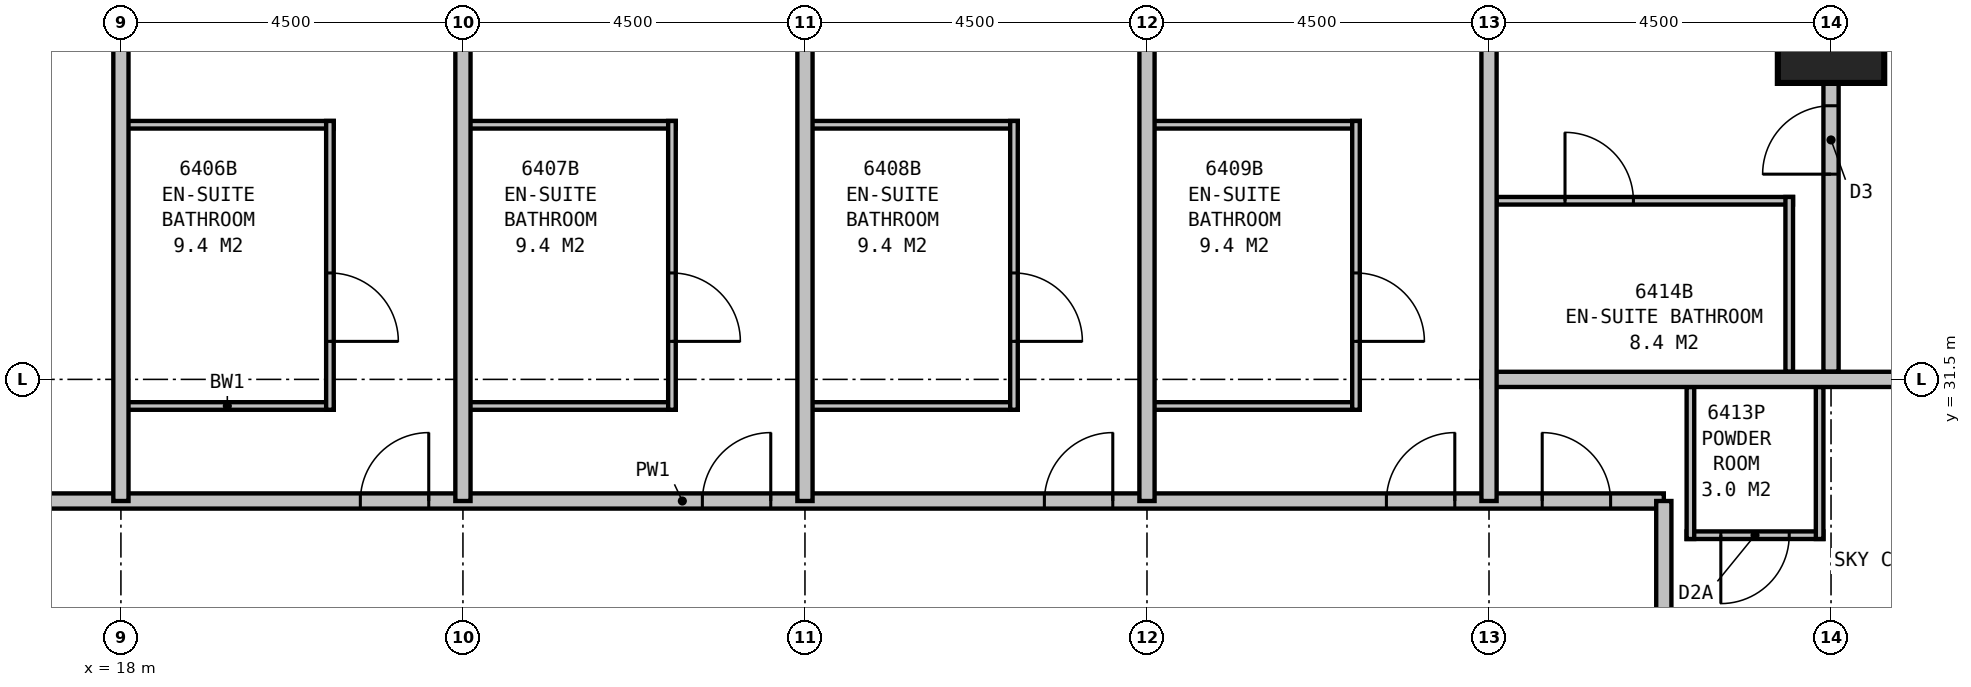
"""IFC4 building model, lengths in metres.
Left out: names, types, materials, properties, quantities, classifications, styles, units other than length and angle.
Written with IfcOpenShell. Run it as: python <this file> out.ifc"""

import sys

from ifc_helpers import new_model, si_unit, direction, frame, frame_2d, origin, origin_2d, place, context, subcontext, project, spatial, rectangle, extrude, element, fill, save


model = new_model("IFC4")
c1 = context("Model", 3, precision=1e-05, world=origin(), true_north=direction((0.0, 1.0)))
c2 = subcontext(c1, "Body", "Model", "MODEL_VIEW")
j1 = project(units=[si_unit("LENGTHUNIT", "METRE"), si_unit("PLANEANGLEUNIT", "RADIAN")], contexts=[c1])
p1 = place(None, origin())
s1 = spatial("IfcSite", under=j1, at=p1, CompositionType="ELEMENT")
p2 = place(p1, origin())
s2 = spatial("IfcBuilding", under=s1, at=p2, CompositionType="ELEMENT")
p3 = place(p2, frame((0.0, 0.0, 250.7)))
s3 = spatial("IfcBuildingStorey", under=s2, at=p3, CompositionType="ELEMENT", Elevation=250.7)
p4 = place(p3, frame((40.5, 36.0, 0.0), z_axis=(0.0, 0.0, 1.0), x_axis=(1.0, 0.0, 0.0)))
e1 = element("IfcColumn", 1, at=p4, inside=s3, PredefinedType="COLUMN", context=c2, shape_type="SweptSolid", body=[
    extrude(rectangle(XDim=1.4, YDim=1.2, at=origin_2d()), origin(), (0.0, 0.0, 1.0), 3.9),
])
p5 = place(p3, frame((12.473, 29.9, 0.0), z_axis=(0.0, 0.0, 1.0), x_axis=(1.0, 0.0, 0.0)))
e2 = element("IfcWall", 2, at=p5, inside=s3, PredefinedType="PARTITIONING", context=c2, shape_type="SweptSolid", body=[
    extrude(rectangle(XDim=25.827, YDim=0.2, at=frame_2d((12.914, 0.0))), origin(), (0.0, 0.0, 1.0), 3.65),
])
p6 = place(p5, frame((0.85, 0.0, 0.0)))
e3 = element("IfcOpeningElement", 3, at=p6, cuts=e2, PredefinedType="OPENING", context=c2, shape_type="SweptSolid", body=[
    extrude(rectangle(XDim=0.9, YDim=2.1, at=frame_2d((0.45, 1.05))), frame((0.0, 0.11, 0.0), z_axis=(0.0, -1.0, 0.0), x_axis=(1.0, 0.0, 0.0)), (0.0, 0.0, 1.0), 0.22),
])
p7 = place(p5, frame((8.677, 0.0, 0.0)))
e4 = element("IfcOpeningElement", 4, at=p7, cuts=e2, PredefinedType="OPENING", context=c2, shape_type="SweptSolid", body=[
    extrude(rectangle(XDim=0.9, YDim=2.1, at=frame_2d((0.45, 1.05))), frame((0.0, 0.11, 0.0), z_axis=(0.0, -1.0, 0.0), x_axis=(1.0, 0.0, 0.0)), (0.0, 0.0, 1.0), 0.22),
])
p8 = place(p5, frame((13.177, 0.0, 0.0)))
e5 = element("IfcOpeningElement", 5, at=p8, cuts=e2, PredefinedType="OPENING", context=c2, shape_type="SweptSolid", body=[
    extrude(rectangle(XDim=0.9, YDim=2.1, at=frame_2d((0.45, 1.05))), frame((0.0, 0.11, 0.0), z_axis=(0.0, -1.0, 0.0), x_axis=(1.0, 0.0, 0.0)), (0.0, 0.0, 1.0), 0.22),
])
p9 = place(p5, frame((17.677, 0.0, 0.0)))
e6 = element("IfcOpeningElement", 6, at=p9, cuts=e2, PredefinedType="OPENING", context=c2, shape_type="SweptSolid", body=[
    extrude(rectangle(XDim=0.9, YDim=2.1, at=frame_2d((0.45, 1.05))), frame((0.0, 0.11, 0.0), z_axis=(0.0, -1.0, 0.0), x_axis=(1.0, 0.0, 0.0)), (0.0, 0.0, 1.0), 0.22),
])
p10 = place(p5, frame((22.177, 0.0, 0.0)))
e7 = element("IfcOpeningElement", 7, at=p10, cuts=e2, PredefinedType="OPENING", context=c2, shape_type="SweptSolid", body=[
    extrude(rectangle(XDim=0.9, YDim=2.1, at=frame_2d((0.45, 1.05))), frame((0.0, 0.11, 0.0), z_axis=(0.0, -1.0, 0.0), x_axis=(1.0, 0.0, 0.0)), (0.0, 0.0, 1.0), 0.22),
])
p11 = place(p5, frame((24.227, 0.0, 0.0)))
e8 = element("IfcOpeningElement", 8, at=p11, cuts=e2, PredefinedType="OPENING", context=c2, shape_type="SweptSolid", body=[
    extrude(rectangle(XDim=0.9, YDim=2.1, at=frame_2d((0.45, 1.05))), frame((0.0, 0.11, 0.0), z_axis=(0.0, -1.0, 0.0), x_axis=(1.0, 0.0, 0.0)), (0.0, 0.0, 1.0), 0.22),
])
p12 = place(p3, frame((38.3, 11.2, 0.0), z_axis=(0.0, 0.0, 1.0), x_axis=(0.0, 1.0, 0.0)))
e9 = element("IfcWall", 9, at=p12, inside=s3, PredefinedType="PARTITIONING", context=c2, shape_type="SweptSolid", body=[
    extrude(rectangle(XDim=18.7, YDim=0.2, at=frame_2d((9.35, 0.0))), origin(), (0.0, 0.0, 1.0), 3.65),
])
p13 = place(p12, frame((6.45, 0.0, 0.0), z_axis=(0.0, 0.0, 1.0), x_axis=(-1.0, 0.0, 0.0)))
e10 = element("IfcOpeningElement", 10, at=p13, cuts=e9, PredefinedType="OPENING", context=c2, shape_type="SweptSolid", body=[
    extrude(rectangle(XDim=1.0, YDim=2.1, at=frame_2d((0.5, 1.05))), frame((0.0, 0.11, 0.0), z_axis=(0.0, -1.0, 0.0), x_axis=(1.0, 0.0, 0.0)), (0.0, 0.0, 1.0), 0.22),
])
p14 = place(p12, frame((10.45, 0.0, 0.0), z_axis=(0.0, 0.0, 1.0), x_axis=(-1.0, 0.0, 0.0)))
e11 = element("IfcOpeningElement", 11, at=p14, cuts=e9, PredefinedType="OPENING", context=c2, shape_type="SweptSolid", body=[
    extrude(rectangle(XDim=0.9, YDim=2.1, at=frame_2d((0.45, 1.05))), frame((0.0, 0.11, 0.0), z_axis=(0.0, -1.0, 0.0), x_axis=(1.0, 0.0, 0.0)), (0.0, 0.0, 1.0), 0.22),
])
for number, where, z_axis, x_axis in (
    (12, (18.0, 29.9, 0.0), (0.0, 0.0, 1.0), (0.0, 1.0, 0.0)),
    (13, (22.5, 29.9, 0.0), (0.0, 0.0, 1.0), (0.0, 1.0, 0.0)),
    (14, (27.0, 29.9, 0.0), (0.0, 0.0, 1.0), (0.0, 1.0, 0.0)),
    (15, (31.5, 29.9, 0.0), (0.0, 0.0, 1.0), (0.0, 1.0, 0.0)),
):
    element("IfcWall", number, at=place(p3, frame(where, z_axis=z_axis, x_axis=x_axis)), inside=s3, PredefinedType="PARTITIONING", context=c2, shape_type="SweptSolid", body=[
        extrude(rectangle(XDim=10.6, YDim=0.2, at=frame_2d((5.3, 0.0))), origin(), (0.0, 0.0, 1.0), 2.65),
    ])
for number, where, z_axis, x_axis in (
    (16, (18.0, 31.15, 0.0), (0.0, 0.0, 1.0), (1.0, 0.0, 0.0)),
    (17, (18.0, 34.85, 0.0), (0.0, 0.0, 1.0), (1.0, 0.0, 0.0)),
):
    element("IfcWall", number, at=place(p3, frame(where, z_axis=z_axis, x_axis=x_axis)), inside=s3, PredefinedType="PLUMBINGWALL", context=c2, shape_type="SweptSolid", body=[
        extrude(rectangle(XDim=2.8, YDim=0.1, at=frame_2d((1.4, 0.0))), origin(), (0.0, 0.0, 1.0), 3.65),
    ])
p15 = place(p3, frame((20.75, 31.1, 0.0), z_axis=(0.0, 0.0, 1.0), x_axis=(0.0, 1.0, 0.0)))
e18 = element("IfcWall", 18, at=p15, inside=s3, PredefinedType="PLUMBINGWALL", context=c2, shape_type="SweptSolid", body=[
    extrude(rectangle(XDim=3.8, YDim=0.1, at=frame_2d((1.9, 0.0))), origin(), (0.0, 0.0, 1.0), 3.65),
])
p16 = place(p15, frame((1.8, 0.0, 0.0), z_axis=(0.0, 0.0, 1.0), x_axis=(-1.0, 0.0, 0.0)))
e19 = element("IfcOpeningElement", 19, at=p16, cuts=e18, PredefinedType="OPENING", context=c2, shape_type="SweptSolid", body=[
    extrude(rectangle(XDim=0.9, YDim=2.1, at=frame_2d((0.45, 1.05))), frame((0.0, 0.06, 0.0), z_axis=(0.0, -1.0, 0.0), x_axis=(1.0, 0.0, 0.0)), (0.0, 0.0, 1.0), 0.12),
])
for number, where, z_axis, x_axis in (
    (20, (22.5, 31.15, 0.0), (0.0, 0.0, 1.0), (1.0, 0.0, 0.0)),
    (21, (22.5, 34.85, 0.0), (0.0, 0.0, 1.0), (1.0, 0.0, 0.0)),
):
    element("IfcWall", number, at=place(p3, frame(where, z_axis=z_axis, x_axis=x_axis)), inside=s3, PredefinedType="PLUMBINGWALL", context=c2, shape_type="SweptSolid", body=[
        extrude(rectangle(XDim=2.8, YDim=0.1, at=frame_2d((1.4, 0.0))), origin(), (0.0, 0.0, 1.0), 3.65),
    ])
p17 = place(p3, frame((25.25, 31.1, 0.0), z_axis=(0.0, 0.0, 1.0), x_axis=(0.0, 1.0, 0.0)))
e22 = element("IfcWall", 22, at=p17, inside=s3, PredefinedType="PLUMBINGWALL", context=c2, shape_type="SweptSolid", body=[
    extrude(rectangle(XDim=3.8, YDim=0.1, at=frame_2d((1.9, 0.0))), origin(), (0.0, 0.0, 1.0), 3.65),
])
p18 = place(p17, frame((1.8, 0.0, 0.0), z_axis=(0.0, 0.0, 1.0), x_axis=(-1.0, 0.0, 0.0)))
e23 = element("IfcOpeningElement", 23, at=p18, cuts=e22, PredefinedType="OPENING", context=c2, shape_type="SweptSolid", body=[
    extrude(rectangle(XDim=0.9, YDim=2.1, at=frame_2d((0.45, 1.05))), frame((0.0, 0.06, 0.0), z_axis=(0.0, -1.0, 0.0), x_axis=(1.0, 0.0, 0.0)), (0.0, 0.0, 1.0), 0.12),
])
for number, where, z_axis, x_axis in (
    (24, (27.0, 31.15, 0.0), (0.0, 0.0, 1.0), (1.0, 0.0, 0.0)),
    (25, (27.0, 34.85, 0.0), (0.0, 0.0, 1.0), (1.0, 0.0, 0.0)),
):
    element("IfcWall", number, at=place(p3, frame(where, z_axis=z_axis, x_axis=x_axis)), inside=s3, PredefinedType="PLUMBINGWALL", context=c2, shape_type="SweptSolid", body=[
        extrude(rectangle(XDim=2.8, YDim=0.1, at=frame_2d((1.4, 0.0))), origin(), (0.0, 0.0, 1.0), 3.65),
    ])
p19 = place(p3, frame((29.75, 31.1, 0.0), z_axis=(0.0, 0.0, 1.0), x_axis=(0.0, 1.0, 0.0)))
e26 = element("IfcWall", 26, at=p19, inside=s3, PredefinedType="PLUMBINGWALL", context=c2, shape_type="SweptSolid", body=[
    extrude(rectangle(XDim=3.8, YDim=0.1, at=frame_2d((1.9, 0.0))), origin(), (0.0, 0.0, 1.0), 3.65),
])
p20 = place(p19, frame((1.8, 0.0, 0.0), z_axis=(0.0, 0.0, 1.0), x_axis=(-1.0, 0.0, 0.0)))
e27 = element("IfcOpeningElement", 27, at=p20, cuts=e26, PredefinedType="OPENING", context=c2, shape_type="SweptSolid", body=[
    extrude(rectangle(XDim=0.9, YDim=2.1, at=frame_2d((0.45, 1.05))), frame((0.0, 0.06, 0.0), z_axis=(0.0, -1.0, 0.0), x_axis=(1.0, 0.0, 0.0)), (0.0, 0.0, 1.0), 0.12),
])
for number, where, z_axis, x_axis in (
    (28, (31.5, 31.15, 0.0), (0.0, 0.0, 1.0), (1.0, 0.0, 0.0)),
    (29, (31.5, 34.85, 0.0), (0.0, 0.0, 1.0), (1.0, 0.0, 0.0)),
):
    element("IfcWall", number, at=place(p3, frame(where, z_axis=z_axis, x_axis=x_axis)), inside=s3, PredefinedType="PLUMBINGWALL", context=c2, shape_type="SweptSolid", body=[
        extrude(rectangle(XDim=2.8, YDim=0.1, at=frame_2d((1.4, 0.0))), origin(), (0.0, 0.0, 1.0), 3.65),
    ])
p21 = place(p3, frame((34.25, 31.1, 0.0), z_axis=(0.0, 0.0, 1.0), x_axis=(0.0, 1.0, 0.0)))
e30 = element("IfcWall", 30, at=p21, inside=s3, PredefinedType="PLUMBINGWALL", context=c2, shape_type="SweptSolid", body=[
    extrude(rectangle(XDim=3.8, YDim=0.1, at=frame_2d((1.9, 0.0))), origin(), (0.0, 0.0, 1.0), 3.65),
])
p22 = place(p21, frame((1.8, 0.0, 0.0), z_axis=(0.0, 0.0, 1.0), x_axis=(-1.0, 0.0, 0.0)))
e31 = element("IfcOpeningElement", 31, at=p22, cuts=e30, PredefinedType="OPENING", context=c2, shape_type="SweptSolid", body=[
    extrude(rectangle(XDim=0.9, YDim=2.1, at=frame_2d((0.45, 1.05))), frame((0.0, 0.06, 0.0), z_axis=(0.0, -1.0, 0.0), x_axis=(1.0, 0.0, 0.0)), (0.0, 0.0, 1.0), 0.12),
])
p23 = place(p3, frame((36.0, 29.9, 0.0), z_axis=(0.0, 0.0, 1.0), x_axis=(0.0, 1.0, 0.0)))
e32 = element("IfcWall", 32, at=p23, inside=s3, PredefinedType="PARTITIONING", context=c2, shape_type="SweptSolid", body=[
    extrude(rectangle(XDim=10.6, YDim=0.2, at=frame_2d((5.3, 0.0))), origin(), (0.0, 0.0, 1.0), 2.65),
])
p24 = place(p3, frame((35.9, 31.5, 0.0), z_axis=(0.0, 0.0, 1.0), x_axis=(1.0, 0.0, 0.0)))
e33 = element("IfcWall", 33, at=p24, inside=s3, PredefinedType="PARTITIONING", context=c2, shape_type="SweptSolid", body=[
    extrude(rectangle(XDim=10.099, YDim=0.2, at=frame_2d((5.05, 0.0))), origin(), (0.0, 0.0, 1.0), 3.65),
])
p25 = place(p24, frame((8.099, 0.0, 0.0)))
e34 = element("IfcOpeningElement", 34, at=p25, cuts=e33, PredefinedType="OPENING", context=c2, shape_type="SweptSolid", body=[
    extrude(rectangle(XDim=0.9, YDim=2.1, at=frame_2d((0.45, 1.05))), frame((0.0, 0.11, 0.0), z_axis=(0.0, -1.0, 0.0), x_axis=(1.0, 0.0, 0.0)), (0.0, 0.0, 1.0), 0.22),
])
p26 = place(p3, frame((40.35, 31.4, 0.0), z_axis=(0.0, 0.0, 1.0), x_axis=(0.0, -1.0, 0.0)))
e35 = element("IfcWall", 35, at=p26, inside=s3, PredefinedType="PLUMBINGWALL", context=c2, shape_type="SweptSolid", body=[
    extrude(rectangle(XDim=2.0, YDim=0.1, at=frame_2d((1.0, 0.0))), origin(), (0.0, 0.0, 1.0), 2.75),
])
p27 = place(p3, frame((38.65, 31.4, 0.0), z_axis=(0.0, 0.0, 1.0), x_axis=(0.0, -1.0, 0.0)))
e36 = element("IfcWall", 36, at=p27, inside=s3, PredefinedType="PLUMBINGWALL", context=c2, shape_type="SweptSolid", body=[
    extrude(rectangle(XDim=2.0, YDim=0.1, at=frame_2d((1.0, 0.0))), origin(), (0.0, 0.0, 1.0), 3.65),
])
p28 = place(p3, frame((38.6, 29.45, 0.0), z_axis=(0.0, 0.0, 1.0), x_axis=(1.0, 0.0, 0.0)))
e37 = element("IfcWall", 37, at=p28, inside=s3, PredefinedType="PLUMBINGWALL", context=c2, shape_type="SweptSolid", body=[
    extrude(rectangle(XDim=1.8, YDim=0.1, at=frame_2d((0.9, 0.0))), origin(), (0.0, 0.0, 1.0), 3.65),
])
p29 = place(p28, frame((1.35, 0.0, 0.0), z_axis=(0.0, 0.0, 1.0), x_axis=(-1.0, 0.0, 0.0)))
e38 = element("IfcOpeningElement", 38, at=p29, cuts=e37, PredefinedType="OPENING", context=c2, shape_type="SweptSolid", body=[
    extrude(rectangle(XDim=0.9, YDim=2.1, at=frame_2d((0.45, 1.05))), frame((0.0, 0.06, 0.0), z_axis=(0.0, -1.0, 0.0), x_axis=(1.0, 0.0, 0.0)), (0.0, 0.0, 1.0), 0.12),
])
p30 = place(p3, frame((40.5, 31.6, 0.0), z_axis=(0.0, 0.0, 1.0), x_axis=(0.0, 1.0, 0.0)))
e39 = element("IfcWall", 39, at=p30, inside=s3, PredefinedType="PARTITIONING", context=c2, shape_type="SweptSolid", body=[
    extrude(rectangle(XDim=4.4, YDim=0.2, at=frame_2d((2.2, 0.0))), origin(), (0.0, 0.0, 1.0), 2.75),
])
p31 = place(p30, frame((2.6, 0.0, 0.0)))
e40 = element("IfcOpeningElement", 40, at=p31, cuts=e39, PredefinedType="OPENING", context=c2, shape_type="SweptSolid", body=[
    extrude(rectangle(XDim=0.9, YDim=2.1, at=frame_2d((0.45, 1.05))), frame((0.0, 0.11, 0.0), z_axis=(0.0, -1.0, 0.0), x_axis=(1.0, 0.0, 0.0)), (0.0, 0.0, 1.0), 0.22),
])
p32 = place(p3, frame((39.95, 31.6, 0.0), z_axis=(0.0, 0.0, 1.0), x_axis=(0.0, 1.0, 0.0)))
e41 = element("IfcWall", 41, at=p32, inside=s3, PredefinedType="PLUMBINGWALL", context=c2, shape_type="SweptSolid", body=[
    extrude(rectangle(XDim=2.3, YDim=0.1, at=frame_2d((1.15, 0.0))), origin(), (0.0, 0.0, 1.0), 3.65),
])
p33 = place(p3, frame((36.1, 33.85, 0.0), z_axis=(0.0, 0.0, 1.0), x_axis=(1.0, 0.0, 0.0)))
e42 = element("IfcWall", 42, at=p33, inside=s3, PredefinedType="PLUMBINGWALL", context=c2, shape_type="SweptSolid", body=[
    extrude(rectangle(XDim=3.9, YDim=0.1, at=frame_2d((1.95, 0.0))), origin(), (0.0, 0.0, 1.0), 3.65),
])
p34 = place(p33, frame((0.9, 0.0, 0.0)))
e43 = element("IfcOpeningElement", 43, at=p34, cuts=e42, PredefinedType="OPENING", context=c2, shape_type="SweptSolid", body=[
    extrude(rectangle(XDim=0.9, YDim=2.1, at=frame_2d((0.45, 1.05))), frame((0.0, 0.06, 0.0), z_axis=(0.0, -1.0, 0.0), x_axis=(1.0, 0.0, 0.0)), (0.0, 0.0, 1.0), 0.12),
])
p35 = place(p7, origin())
e44 = element("IfcDoor", 44, at=p35, inside=s3, OperationType="SINGLE_SWING_RIGHT", PredefinedType="DOOR", context=c2, shape_type="SweptSolid", body=[
    extrude(rectangle(XDim=0.9, YDim=2.1, at=frame_2d((0.45, 1.05))), frame((0.0, 0.025, 0.0), z_axis=(0.0, -1.0, 0.0), x_axis=(1.0, 0.0, 0.0)), (0.0, 0.0, 1.0), 0.05),
])
fill(e4, e44)
p36 = place(p8, origin())
e45 = element("IfcDoor", 45, at=p36, inside=s3, OperationType="SINGLE_SWING_RIGHT", PredefinedType="DOOR", context=c2, shape_type="SweptSolid", body=[
    extrude(rectangle(XDim=0.9, YDim=2.1, at=frame_2d((0.45, 1.05))), frame((0.0, 0.025, 0.0), z_axis=(0.0, -1.0, 0.0), x_axis=(1.0, 0.0, 0.0)), (0.0, 0.0, 1.0), 0.05),
])
fill(e5, e45)
p37 = place(p9, origin())
e46 = element("IfcDoor", 46, at=p37, inside=s3, OperationType="SINGLE_SWING_RIGHT", PredefinedType="DOOR", context=c2, shape_type="SweptSolid", body=[
    extrude(rectangle(XDim=0.9, YDim=2.1, at=frame_2d((0.45, 1.05))), frame((0.0, 0.025, 0.0), z_axis=(0.0, -1.0, 0.0), x_axis=(1.0, 0.0, 0.0)), (0.0, 0.0, 1.0), 0.05),
])
fill(e6, e46)
p38 = place(p10, origin())
e47 = element("IfcDoor", 47, at=p38, inside=s3, OperationType="SINGLE_SWING_RIGHT", PredefinedType="DOOR", context=c2, shape_type="SweptSolid", body=[
    extrude(rectangle(XDim=0.9, YDim=2.1, at=frame_2d((0.45, 1.05))), frame((0.0, 0.025, 0.0), z_axis=(0.0, -1.0, 0.0), x_axis=(1.0, 0.0, 0.0)), (0.0, 0.0, 1.0), 0.05),
])
fill(e7, e47)
p39 = place(p11, origin())
e48 = element("IfcDoor", 48, at=p39, inside=s3, OperationType="SINGLE_SWING_LEFT", PredefinedType="DOOR", context=c2, shape_type="SweptSolid", body=[
    extrude(rectangle(XDim=0.9, YDim=2.1, at=frame_2d((0.45, 1.05))), frame((0.0, 0.025, 0.0), z_axis=(0.0, -1.0, 0.0), x_axis=(1.0, 0.0, 0.0)), (0.0, 0.0, 1.0), 0.05),
])
fill(e8, e48)
p40 = place(p16, origin())
e49 = element("IfcDoor", 49, at=p40, inside=s3, OperationType="SINGLE_SWING_RIGHT", PredefinedType="DOOR", context=c2, shape_type="SweptSolid", body=[
    extrude(rectangle(XDim=0.9, YDim=2.1, at=frame_2d((0.45, 1.05))), frame((0.0, 0.025, 0.0), z_axis=(0.0, -1.0, 0.0), x_axis=(1.0, 0.0, 0.0)), (0.0, 0.0, 1.0), 0.05),
])
fill(e19, e49)
p41 = place(p18, origin())
e50 = element("IfcDoor", 50, at=p41, inside=s3, OperationType="SINGLE_SWING_RIGHT", PredefinedType="DOOR", context=c2, shape_type="SweptSolid", body=[
    extrude(rectangle(XDim=0.9, YDim=2.1, at=frame_2d((0.45, 1.05))), frame((0.0, 0.025, 0.0), z_axis=(0.0, -1.0, 0.0), x_axis=(1.0, 0.0, 0.0)), (0.0, 0.0, 1.0), 0.05),
])
fill(e23, e50)
p42 = place(p20, origin())
e51 = element("IfcDoor", 51, at=p42, inside=s3, OperationType="SINGLE_SWING_RIGHT", PredefinedType="DOOR", context=c2, shape_type="SweptSolid", body=[
    extrude(rectangle(XDim=0.9, YDim=2.1, at=frame_2d((0.45, 1.05))), frame((0.0, 0.025, 0.0), z_axis=(0.0, -1.0, 0.0), x_axis=(1.0, 0.0, 0.0)), (0.0, 0.0, 1.0), 0.05),
])
fill(e27, e51)
p43 = place(p22, origin())
e52 = element("IfcDoor", 52, at=p43, inside=s3, OperationType="SINGLE_SWING_RIGHT", PredefinedType="DOOR", context=c2, shape_type="SweptSolid", body=[
    extrude(rectangle(XDim=0.9, YDim=2.1, at=frame_2d((0.45, 1.05))), frame((0.0, 0.025, 0.0), z_axis=(0.0, -1.0, 0.0), x_axis=(1.0, 0.0, 0.0)), (0.0, 0.0, 1.0), 0.05),
])
fill(e31, e52)
p44 = place(p29, origin())
e53 = element("IfcDoor", 53, at=p44, inside=s3, OperationType="SINGLE_SWING_RIGHT", PredefinedType="DOOR", context=c2, shape_type="SweptSolid", body=[
    extrude(rectangle(XDim=0.9, YDim=2.1, at=frame_2d((0.45, 1.05))), frame((0.0, 0.025, 0.0), z_axis=(0.0, -1.0, 0.0), x_axis=(1.0, 0.0, 0.0)), (0.0, 0.0, 1.0), 0.05),
])
fill(e38, e53)
p45 = place(p31, origin())
e54 = element("IfcDoor", 54, at=p45, inside=s3, OperationType="SINGLE_SWING_LEFT", PredefinedType="DOOR", context=c2, shape_type="SweptSolid", body=[
    extrude(rectangle(XDim=0.9, YDim=2.1, at=frame_2d((0.45, 1.05))), frame((0.0, 0.025, 0.0), z_axis=(0.0, -1.0, 0.0), x_axis=(1.0, 0.0, 0.0)), (0.0, 0.0, 1.0), 0.05),
])
fill(e40, e54)
p46 = place(p34, origin())
e55 = element("IfcDoor", 55, at=p46, inside=s3, OperationType="SINGLE_SWING_LEFT", PredefinedType="DOOR", context=c2, shape_type="SweptSolid", body=[
    extrude(rectangle(XDim=0.9, YDim=2.1, at=frame_2d((0.45, 1.05))), frame((0.0, 0.025, 0.0), z_axis=(0.0, -1.0, 0.0), x_axis=(1.0, 0.0, 0.0)), (0.0, 0.0, 1.0), 0.05),
])
fill(e43, e55)
save(model, sys.argv[1])
